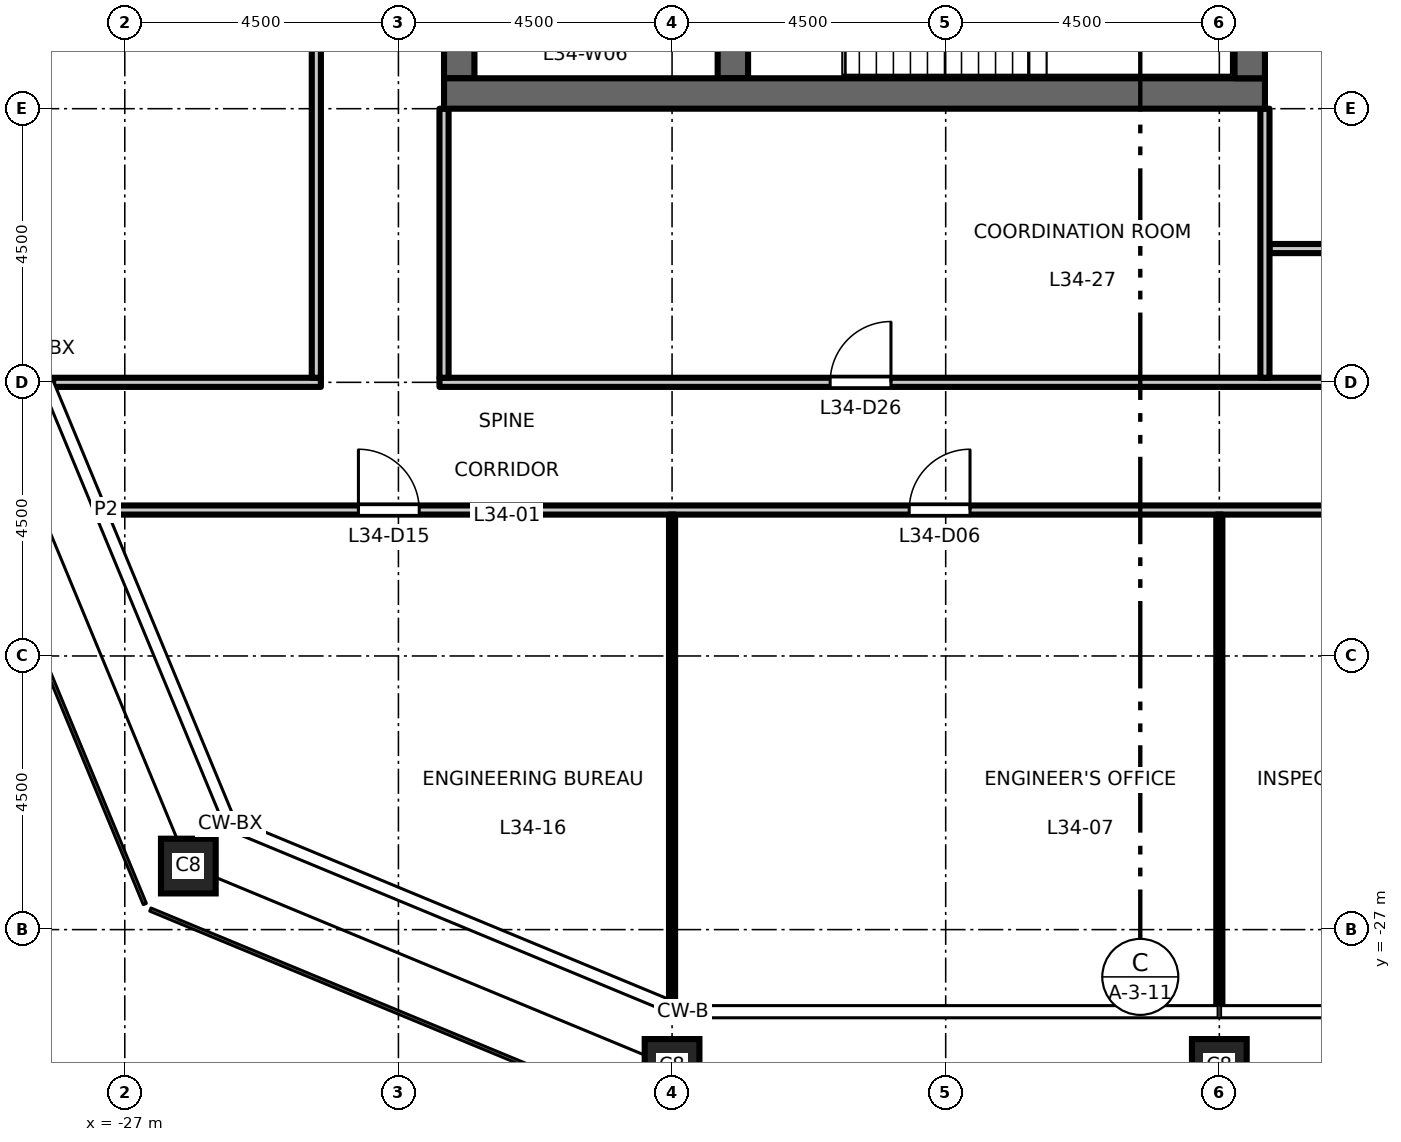
"""IFC4 building model, lengths in metres.
Left out: names, types, materials, properties, quantities, classifications, styles, units other than length and angle.
Written with IfcOpenShell. Run it as: python <this file> out.ifc"""

import sys

from ifc_helpers import new_model, si_unit, direction, frame, frame_2d, origin, origin_2d, place, context, subcontext, project, spatial, rectangle, hollow_rectangle, extrude, element, fill, save


model = new_model("IFC4")
c1 = context("Model", 3, precision=1e-05, world=origin(), true_north=direction((0.0, 1.0)))
c2 = subcontext(c1, "Body", "Model", "MODEL_VIEW")
j1 = project(units=[si_unit("LENGTHUNIT", "METRE"), si_unit("PLANEANGLEUNIT", "RADIAN")], contexts=[c1])
p1 = place(None, origin())
s1 = spatial("IfcSite", under=j1, at=p1, CompositionType="ELEMENT")
p2 = place(p1, origin())
s2 = spatial("IfcBuilding", under=s1, at=p2, CompositionType="ELEMENT")
p3 = place(p2, frame((0.0, 0.0, 158.7)))
s3 = spatial("IfcBuildingStorey", under=s2, at=p3, CompositionType="ELEMENT", Elevation=158.7)
for number, where, z_axis, x_axis in (
    (1, (-18.0, -29.25, 0.0), (0.0, 0.0, 1.0), (1.0, 0.0, 0.0)),
    (2, (-9.0, -29.25, 0.0), (0.0, 0.0, 1.0), (1.0, 0.0, 0.0)),
    (3, (-25.955, -25.955, 0.0), (0.0, 0.0, 1.0), (1.0, 0.0, 0.0)),
):
    element("IfcColumn", number, at=place(p3, frame(where, z_axis=z_axis, x_axis=x_axis)), inside=s3, PredefinedType="COLUMN", context=c2, shape_type="SweptSolid", body=[
        extrude(hollow_rectangle(XDim=0.9, YDim=0.9, WallThickness=0.05, at=origin_2d()), origin(), (0.0, 0.0, 1.0), 4.5),
    ])
p4 = place(p3, frame((-21.5, -13.0, 0.0), z_axis=(0.0, 0.0, 1.0), x_axis=(0.0, 1.0, 0.0)))
e4 = element("IfcWall", 4, at=p4, inside=s3, PredefinedType="SHEAR", context=c2, shape_type="SweptSolid", body=[
    extrude(rectangle(XDim=26.0, YDim=0.5, at=frame_2d((13.0, 0.0))), origin(), (0.0, 0.0, 1.0), 4.35),
])
p5 = place(p4, frame((16.825, 0.0, 0.0)))
e5 = element("IfcOpeningElement", 5, at=p5, cuts=e4, PredefinedType="OPENING", context=c2, shape_type="SweptSolid", body=[
    extrude(rectangle(XDim=1.8, YDim=2.1, at=frame_2d((0.9, 1.05))), frame((0.0, 0.26, 0.0), z_axis=(0.0, -1.0, 0.0), x_axis=(1.0, 0.0, 0.0)), (0.0, 0.0, 1.0), 0.52),
])
p6 = place(p4, frame((7.375, 0.0, 0.0)))
e6 = element("IfcOpeningElement", 6, at=p6, cuts=e4, PredefinedType="OPENING", context=c2, shape_type="SweptSolid", body=[
    extrude(rectangle(XDim=1.8, YDim=2.1, at=frame_2d((0.9, 1.05))), frame((0.0, 0.26, 0.0), z_axis=(0.0, -1.0, 0.0), x_axis=(1.0, 0.0, 0.0)), (0.0, 0.0, 1.0), 0.52),
])
p7 = place(p4, frame((1.3, 0.0, 0.0)))
e7 = element("IfcOpeningElement", 7, at=p7, cuts=e4, PredefinedType="OPENING", context=c2, shape_type="SweptSolid", body=[
    extrude(rectangle(XDim=0.9, YDim=2.1, at=frame_2d((0.45, 1.05))), frame((0.0, 0.26, 0.0), z_axis=(0.0, -1.0, 0.0), x_axis=(1.0, 0.0, 0.0)), (0.0, 0.0, 1.0), 0.52),
])
p8 = place(p3, frame((-17.0, -13.0, 0.0), z_axis=(0.0, 0.0, 1.0), x_axis=(0.0, 1.0, 0.0)))
e8 = element("IfcWall", 8, at=p8, inside=s3, PredefinedType="SHEAR", context=c2, shape_type="SweptSolid", body=[
    extrude(rectangle(XDim=6.575, YDim=0.5, at=frame_2d((3.288, 0.0))), origin(), (0.0, 0.0, 1.0), 4.35),
])
p9 = place(p3, frame((-8.25, -13.25, 0.0), z_axis=(0.0, 0.0, 1.0), x_axis=(-1.0, 0.0, 0.0)))
e9 = element("IfcWall", 9, at=p9, inside=s3, PredefinedType="SHEAR", context=c2, shape_type="SweptSolid", body=[
    extrude(rectangle(XDim=13.5, YDim=0.5, at=frame_2d((6.75, 0.0))), origin(), (0.0, 0.0, 1.0), 4.35),
])
p10 = place(p3, frame((-8.5, -13.0, 0.0), z_axis=(0.0, 0.0, 1.0), x_axis=(0.0, 1.0, 0.0)))
e10 = element("IfcWall", 10, at=p10, inside=s3, PredefinedType="SHEAR", context=c2, shape_type="SweptSolid", body=[
    extrude(rectangle(XDim=26.0, YDim=0.5, at=frame_2d((13.0, 0.0))), origin(), (0.0, 0.0, 1.0), 4.35),
])
p11 = place(p3, frame((-27.308, -20.1, 0.0), z_axis=(0.0, 0.0, 1.0), x_axis=(1.0, 0.0, 0.0)))
e11 = element("IfcWall", 11, at=p11, inside=s3, PredefinedType="PARTITIONING", context=c2, shape_type="SweptSolid", body=[
    extrude(rectangle(XDim=54.616, YDim=0.15, at=frame_2d((27.308, 0.0))), origin(), (0.0, 0.0, 1.0), 4.35),
])
p12 = place(p11, frame((13.208, 0.0, 0.0)))
e12 = element("IfcOpeningElement", 12, at=p12, cuts=e11, PredefinedType="OPENING", context=c2, shape_type="SweptSolid", body=[
    extrude(rectangle(XDim=1.0, YDim=2.1, at=frame_2d((0.5, 1.05))), frame((0.0, 0.085, 0.0), z_axis=(0.0, -1.0, 0.0), x_axis=(1.0, 0.0, 0.0)), (0.0, 0.0, 1.0), 0.17),
])
p13 = place(p11, frame((22.208, 0.0, 0.0)))
e13 = element("IfcOpeningElement", 13, at=p13, cuts=e11, PredefinedType="OPENING", context=c2, shape_type="SweptSolid", body=[
    extrude(rectangle(XDim=1.0, YDim=2.1, at=frame_2d((0.5, 1.05))), frame((0.0, 0.085, 0.0), z_axis=(0.0, -1.0, 0.0), x_axis=(1.0, 0.0, 0.0)), (0.0, 0.0, 1.0), 0.17),
])
p14 = place(p11, frame((31.208, 0.0, 0.0)))
e14 = element("IfcOpeningElement", 14, at=p14, cuts=e11, PredefinedType="OPENING", context=c2, shape_type="SweptSolid", body=[
    extrude(rectangle(XDim=1.0, YDim=2.1, at=frame_2d((0.5, 1.05))), frame((0.0, 0.085, 0.0), z_axis=(0.0, -1.0, 0.0), x_axis=(1.0, 0.0, 0.0)), (0.0, 0.0, 1.0), 0.17),
])
p15 = place(p11, frame((40.208, 0.0, 0.0)))
e15 = element("IfcOpeningElement", 15, at=p15, cuts=e11, PredefinedType="OPENING", context=c2, shape_type="SweptSolid", body=[
    extrude(rectangle(XDim=1.0, YDim=2.1, at=frame_2d((0.5, 1.05))), frame((0.0, 0.085, 0.0), z_axis=(0.0, -1.0, 0.0), x_axis=(1.0, 0.0, 0.0)), (0.0, 0.0, 1.0), 0.17),
])
p16 = place(p11, frame((4.15, 0.0, 0.0)))
e16 = element("IfcOpeningElement", 16, at=p16, cuts=e11, PredefinedType="OPENING", context=c2, shape_type="SweptSolid", body=[
    extrude(rectangle(XDim=1.0, YDim=2.1, at=frame_2d((0.5, 1.05))), frame((0.0, 0.085, 0.0), z_axis=(0.0, -1.0, 0.0), x_axis=(1.0, 0.0, 0.0)), (0.0, 0.0, 1.0), 0.17),
])
p17 = place(p11, frame((49.458, 0.0, 0.0)))
e17 = element("IfcOpeningElement", 17, at=p17, cuts=e11, PredefinedType="OPENING", context=c2, shape_type="SweptSolid", body=[
    extrude(rectangle(XDim=1.0, YDim=2.1, at=frame_2d((0.5, 1.05))), frame((0.0, 0.085, 0.0), z_axis=(0.0, -1.0, 0.0), x_axis=(1.0, 0.0, 0.0)), (0.0, 0.0, 1.0), 0.17),
])
p18 = place(p3, frame((-28.178, -18.0, 0.0), z_axis=(0.0, 0.0, 1.0), x_axis=(1.0, 0.0, 0.0)))
e18 = element("IfcWall", 18, at=p18, inside=s3, PredefinedType="PARTITIONING", context=c2, shape_type="SweptSolid", body=[
    extrude(rectangle(XDim=4.403, YDim=0.15, at=frame_2d((2.202, 0.0))), origin(), (0.0, 0.0, 1.0), 4.35),
])
p19 = place(p3, frame((-21.825, -18.0, 0.0), z_axis=(0.0, 0.0, 1.0), x_axis=(1.0, 0.0, 0.0)))
e19 = element("IfcWall", 19, at=p19, inside=s3, PredefinedType="PARTITIONING", context=c2, shape_type="SweptSolid", body=[
    extrude(rectangle(XDim=43.65, YDim=0.15, at=frame_2d((21.825, 0.0))), origin(), (0.0, 0.0, 1.0), 4.35),
])
p20 = place(p19, frame((21.425, 0.0, 0.0)))
e20 = element("IfcOpeningElement", 20, at=p20, cuts=e19, PredefinedType="OPENING", context=c2, shape_type="SweptSolid", body=[
    extrude(rectangle(XDim=1.0, YDim=2.1, at=frame_2d((0.5, 1.05))), frame((0.0, 0.085, 0.0), z_axis=(0.0, -1.0, 0.0), x_axis=(1.0, 0.0, 0.0)), (0.0, 0.0, 1.0), 0.17),
])
p21 = place(p19, frame((6.425, 0.0, 0.0)))
e21 = element("IfcOpeningElement", 21, at=p21, cuts=e19, PredefinedType="OPENING", context=c2, shape_type="SweptSolid", body=[
    extrude(rectangle(XDim=1.0, YDim=2.1, at=frame_2d((0.5, 1.05))), frame((0.0, 0.085, 0.0), z_axis=(0.0, -1.0, 0.0), x_axis=(1.0, 0.0, 0.0)), (0.0, 0.0, 1.0), 0.17),
])
p22 = place(p19, frame((36.425, 0.0, 0.0)))
e22 = element("IfcOpeningElement", 22, at=p22, cuts=e19, PredefinedType="OPENING", context=c2, shape_type="SweptSolid", body=[
    extrude(rectangle(XDim=1.0, YDim=2.1, at=frame_2d((0.5, 1.05))), frame((0.0, 0.085, 0.0), z_axis=(0.0, -1.0, 0.0), x_axis=(1.0, 0.0, 0.0)), (0.0, 0.0, 1.0), 0.17),
])
p23 = place(p3, frame((-8.175, -15.8, 0.0), z_axis=(0.0, 0.0, 1.0), x_axis=(1.0, 0.0, 0.0)))
e23 = element("IfcWall", 23, at=p23, inside=s3, PredefinedType="PARTITIONING", context=c2, shape_type="SweptSolid", body=[
    extrude(rectangle(XDim=14.975, YDim=0.15, at=frame_2d((7.488, 0.0))), origin(), (0.0, 0.0, 1.0), 4.35),
])
p24 = place(p23, frame((2.525, 0.0, 0.0)))
e24 = element("IfcOpeningElement", 24, at=p24, cuts=e23, PredefinedType="OPENING", context=c2, shape_type="SweptSolid", body=[
    extrude(rectangle(XDim=1.0, YDim=2.1, at=frame_2d((0.5, 1.05))), frame((0.0, 0.085, 0.0), z_axis=(0.0, -1.0, 0.0), x_axis=(1.0, 0.0, 0.0)), (0.0, 0.0, 1.0), 0.17),
])
p25 = place(p23, frame((8.775, 0.0, 0.0)))
e25 = element("IfcOpeningElement", 25, at=p25, cuts=e23, PredefinedType="OPENING", context=c2, shape_type="SweptSolid", body=[
    extrude(rectangle(XDim=1.0, YDim=2.1, at=frame_2d((0.5, 1.05))), frame((0.0, 0.085, 0.0), z_axis=(0.0, -1.0, 0.0), x_axis=(1.0, 0.0, 0.0)), (0.0, 0.0, 1.0), 0.17),
])
p26 = place(p23, frame((13.325, 0.0, 0.0)))
e26 = element("IfcOpeningElement", 26, at=p26, cuts=e23, PredefinedType="OPENING", context=c2, shape_type="SweptSolid", body=[
    extrude(rectangle(XDim=1.0, YDim=2.1, at=frame_2d((0.5, 1.05))), frame((0.0, 0.085, 0.0), z_axis=(0.0, -1.0, 0.0), x_axis=(1.0, 0.0, 0.0)), (0.0, 0.0, 1.0), 0.17),
])
p27 = place(p3, frame((-23.85, -17.925, 0.0), z_axis=(0.0, 0.0, 1.0), x_axis=(0.0, 1.0, 0.0)))
e27 = element("IfcWall", 27, at=p27, inside=s3, PredefinedType="PARTITIONING", context=c2, shape_type="SweptSolid", body=[
    extrude(rectangle(XDim=35.85, YDim=0.15, at=frame_2d((17.925, 0.0))), origin(), (0.0, 0.0, 1.0), 4.35),
])
p28 = place(p3, frame((-21.75, -17.925, 0.0), z_axis=(0.0, 0.0, 1.0), x_axis=(0.0, 1.0, 0.0)))
e28 = element("IfcWall", 28, at=p28, inside=s3, PredefinedType="PARTITIONING", context=c2, shape_type="SweptSolid", body=[
    extrude(rectangle(XDim=4.425, YDim=0.15, at=frame_2d((2.212, 0.0))), origin(), (0.0, 0.0, 1.0), 4.35),
])
p29 = place(p3, frame((-18.0, -28.178, 0.0), z_axis=(0.0, 0.0, 1.0), x_axis=(0.0, 1.0, 0.0)))
e29 = element("IfcWall", 29, at=p29, inside=s3, PredefinedType="PARTITIONING", context=c2, shape_type="SweptSolid", body=[
    extrude(rectangle(XDim=8.003, YDim=0.1, at=frame_2d((4.001, 0.0))), origin(), (0.0, 0.0, 1.0), 3.45),
])
p30 = place(p3, frame((-9.0, -28.26, 0.0), z_axis=(0.0, 0.0, 1.0), x_axis=(0.0, 1.0, 0.0)))
e30 = element("IfcWall", 30, at=p30, inside=s3, PredefinedType="PARTITIONING", context=c2, shape_type="SweptSolid", body=[
    extrude(rectangle(XDim=8.085, YDim=0.1, at=frame_2d((4.042, 0.0))), origin(), (0.0, 0.0, 1.0), 3.45),
])
p31 = place(p3, frame((-8.25, -17.925, 0.0), z_axis=(0.0, 0.0, 1.0), x_axis=(0.0, 1.0, 0.0)))
e31 = element("IfcWall", 31, at=p31, inside=s3, PredefinedType="PARTITIONING", context=c2, shape_type="SweptSolid", body=[
    extrude(rectangle(XDim=4.425, YDim=0.15, at=frame_2d((2.212, 0.0))), origin(), (0.0, 0.0, 1.0), 4.35),
])
p32 = place(p12, origin())
e32 = element("IfcDoor", 32, at=p32, inside=s3, OperationType="SINGLE_SWING_RIGHT", PredefinedType="DOOR", context=c2, shape_type="SweptSolid", body=[
    extrude(rectangle(XDim=1.0, YDim=2.1, at=frame_2d((0.5, 1.05))), frame((0.0, 0.025, 0.0), z_axis=(0.0, -1.0, 0.0), x_axis=(1.0, 0.0, 0.0)), (0.0, 0.0, 1.0), 0.05),
])
fill(e12, e32)
p33 = place(p16, origin())
e33 = element("IfcDoor", 33, at=p33, inside=s3, OperationType="SINGLE_SWING_LEFT", PredefinedType="DOOR", context=c2, shape_type="SweptSolid", body=[
    extrude(rectangle(XDim=1.0, YDim=2.1, at=frame_2d((0.5, 1.05))), frame((0.0, 0.025, 0.0), z_axis=(0.0, -1.0, 0.0), x_axis=(1.0, 0.0, 0.0)), (0.0, 0.0, 1.0), 0.05),
])
fill(e16, e33)
p34 = place(p21, origin())
e34 = element("IfcDoor", 34, at=p34, inside=s3, OperationType="SINGLE_SWING_RIGHT", PredefinedType="DOOR", context=c2, shape_type="SweptSolid", body=[
    extrude(rectangle(XDim=1.0, YDim=2.1, at=frame_2d((0.5, 1.05))), frame((0.0, 0.025, 0.0), z_axis=(0.0, -1.0, 0.0), x_axis=(1.0, 0.0, 0.0)), (0.0, 0.0, 1.0), 0.05),
])
fill(e21, e34)
save(model, sys.argv[1])
